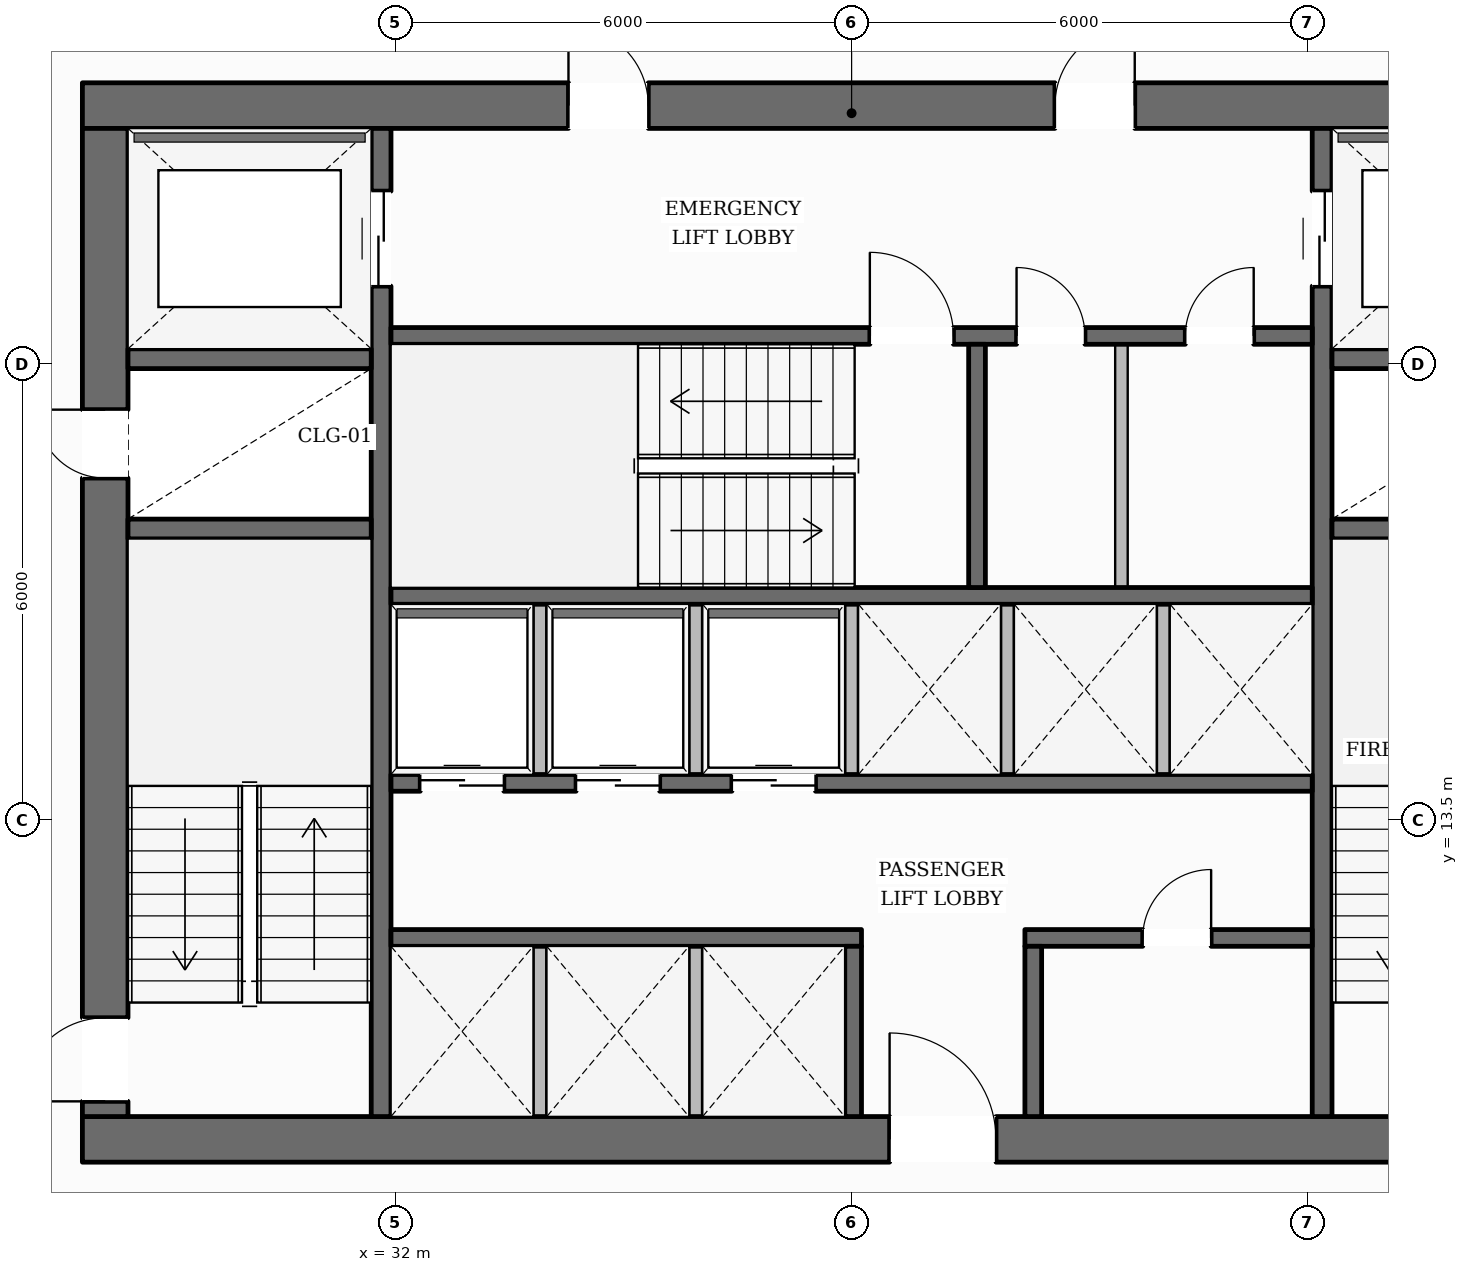
"""IFC4 building model, lengths in metres.
Left out: names, types, materials, properties, quantities, classifications, styles, units other than length and angle.
Written with IfcOpenShell. Run it as: python <this file> out.ifc"""

import sys

from ifc_helpers import new_model, si_unit, direction, frame, frame_2d, origin, place, context, subcontext, project, spatial, rectangle, extrude, element, fill, save


model = new_model("IFC4")
c1 = context("Model", 3, precision=1e-05, world=origin(), true_north=direction((0.0, 1.0)))
c2 = subcontext(c1, "Body", "Model", "MODEL_VIEW")
j1 = project(units=[si_unit("LENGTHUNIT", "METRE"), si_unit("PLANEANGLEUNIT", "RADIAN")], contexts=[c1])
p1 = place(None, origin())
s1 = spatial("IfcSite", under=j1, at=p1, CompositionType="ELEMENT")
p2 = place(p1, origin())
s2 = spatial("IfcBuilding", under=s1, at=p2, CompositionType="ELEMENT")
p3 = place(p2, frame((0.0, 0.0, 17.55)))
s3 = spatial("IfcBuildingStorey", under=s2, at=p3, CompositionType="ELEMENT", Elevation=17.55)
p4 = place(p3, frame((27.88, 9.3, 0.0), z_axis=(0.0, 0.0, 1.0), x_axis=(1.0, 0.0, 0.0)))
e1 = element("IfcWall", 1, at=p4, inside=s3, PredefinedType="SOLIDWALL", context=c2, shape_type="SweptSolid", body=[
    extrude(rectangle(XDim=20.24, YDim=0.6, at=frame_2d((10.12, 0.0))), origin(), (0.0, 0.0, 1.0), 3.59),
])
p5 = place(p4, frame((10.62, 0.0, 0.0)))
e2 = element("IfcOpeningElement", 2, at=p5, cuts=e1, PredefinedType="OPENING", context=c2, shape_type="SweptSolid", body=[
    extrude(rectangle(XDim=1.4, YDim=2.2, at=frame_2d((0.7, 1.1))), frame((0.0, 0.31, 0.0), z_axis=(0.0, -1.0, 0.0), x_axis=(1.0, 0.0, 0.0)), (0.0, 0.0, 1.0), 0.62),
])
p6 = place(p3, frame((27.88, 22.9, 0.0), z_axis=(0.0, 0.0, 1.0), x_axis=(1.0, 0.0, 0.0)))
e3 = element("IfcWall", 3, at=p6, inside=s3, PredefinedType="SOLIDWALL", context=c2, shape_type="SweptSolid", body=[
    extrude(rectangle(XDim=20.24, YDim=0.6, at=frame_2d((10.12, 0.0))), origin(), (0.0, 0.0, 1.0), 3.59),
])
p7 = place(p6, frame((6.395, 0.0, 0.0)))
e4 = element("IfcOpeningElement", 4, at=p7, cuts=e3, PredefinedType="OPENING", context=c2, shape_type="SweptSolid", body=[
    extrude(rectangle(XDim=1.05, YDim=2.15, at=frame_2d((0.525, 1.075))), frame((0.0, 0.31, 0.0), z_axis=(0.0, -1.0, 0.0), x_axis=(1.0, 0.0, 0.0)), (0.0, 0.0, 1.0), 0.62),
])
p8 = place(p6, frame((12.795, 0.0, 0.0)))
e5 = element("IfcOpeningElement", 5, at=p8, cuts=e3, PredefinedType="OPENING", context=c2, shape_type="SweptSolid", body=[
    extrude(rectangle(XDim=1.05, YDim=2.15, at=frame_2d((0.525, 1.075))), frame((0.0, 0.31, 0.0), z_axis=(0.0, -1.0, 0.0), x_axis=(1.0, 0.0, 0.0)), (0.0, 0.0, 1.0), 0.62),
])
p9 = place(p3, frame((28.18, 9.6, 0.0), z_axis=(0.0, 0.0, 1.0), x_axis=(0.0, 1.0, 0.0)))
e6 = element("IfcWall", 6, at=p9, inside=s3, PredefinedType="SOLIDWALL", context=c2, shape_type="SweptSolid", body=[
    extrude(rectangle(XDim=13.0, YDim=0.6, at=frame_2d((6.5, 0.0))), origin(), (0.0, 0.0, 1.0), 3.59),
])
p10 = place(p9, frame((0.2, 0.0, 0.0)))
e7 = element("IfcOpeningElement", 7, at=p10, cuts=e6, PredefinedType="OPENING", context=c2, shape_type="SweptSolid", body=[
    extrude(rectangle(XDim=1.1, YDim=2.15, at=frame_2d((0.55, 1.075))), frame((0.0, 0.31, 0.0), z_axis=(0.0, -1.0, 0.0), x_axis=(1.0, 0.0, 0.0)), (0.0, 0.0, 1.0), 0.62),
])
p11 = place(p9, frame((8.4, 0.0, 0.0)))
e8 = element("IfcOpeningElement", 8, at=p11, cuts=e6, PredefinedType="OPENING", context=c2, shape_type="SweptSolid", body=[
    extrude(rectangle(XDim=0.9, YDim=2.1, at=frame_2d((0.45, 1.05))), frame((0.0, 0.31, 0.0), z_axis=(0.0, -1.0, 0.0), x_axis=(1.0, 0.0, 0.0)), (0.0, 0.0, 1.0), 0.62),
])
p12 = place(p3, frame((31.81, 9.6, 0.0), z_axis=(0.0, 0.0, 1.0), x_axis=(0.0, 1.0, 0.0)))
e9 = element("IfcWall", 9, at=p12, inside=s3, PredefinedType="SHEAR", context=c2, shape_type="SweptSolid", body=[
    extrude(rectangle(XDim=13.0, YDim=0.26, at=frame_2d((6.5, 0.0))), origin(), (0.0, 0.0, 1.0), 3.59),
])
p13 = place(p12, frame((10.925, 0.0, 0.0)))
e10 = element("IfcOpeningElement", 10, at=p13, cuts=e9, PredefinedType="OPENING", context=c2, shape_type="SweptSolid", body=[
    extrude(rectangle(XDim=1.25, YDim=2.25, at=frame_2d((0.625, 1.125))), frame((0.0, 0.14, 0.0), z_axis=(0.0, -1.0, 0.0), x_axis=(1.0, 0.0, 0.0)), (0.0, 0.0, 1.0), 0.28),
])
p14 = place(p3, frame((44.19, 9.6, 0.0), z_axis=(0.0, 0.0, 1.0), x_axis=(0.0, 1.0, 0.0)))
e11 = element("IfcWall", 11, at=p14, inside=s3, PredefinedType="SHEAR", context=c2, shape_type="SweptSolid", body=[
    extrude(rectangle(XDim=13.0, YDim=0.26, at=frame_2d((6.5, 0.0))), origin(), (0.0, 0.0, 1.0), 3.59),
])
p15 = place(p14, frame((10.925, 0.0, 0.0)))
e12 = element("IfcOpeningElement", 12, at=p15, cuts=e11, PredefinedType="OPENING", context=c2, shape_type="SweptSolid", body=[
    extrude(rectangle(XDim=1.25, YDim=2.25, at=frame_2d((0.625, 1.125))), frame((0.0, 0.14, 0.0), z_axis=(0.0, -1.0, 0.0), x_axis=(1.0, 0.0, 0.0)), (0.0, 0.0, 1.0), 0.28),
])
for number, where, z_axis, x_axis in (
    (13, (28.48, 17.33, 0.0), (0.0, 0.0, 1.0), (1.0, 0.0, 0.0)),
    (14, (28.48, 19.57, 0.0), (0.0, 0.0, 1.0), (1.0, 0.0, 0.0)),
    (15, (44.32, 17.33, 0.0), (0.0, 0.0, 1.0), (1.0, 0.0, 0.0)),
    (16, (44.32, 19.57, 0.0), (0.0, 0.0, 1.0), (1.0, 0.0, 0.0)),
):
    element("IfcWall", number, at=place(p3, frame(where, z_axis=z_axis, x_axis=x_axis)), inside=s3, PredefinedType="SHEAR", context=c2, shape_type="SweptSolid", body=[
        extrude(rectangle(XDim=3.2, YDim=0.26, at=frame_2d((1.6, 0.0))), origin(), (0.0, 0.0, 1.0), 3.59),
    ])
p16 = place(p3, frame((31.94, 19.87, 0.0), z_axis=(0.0, 0.0, 1.0), x_axis=(1.0, 0.0, 0.0)))
e17 = element("IfcWall", 17, at=p16, inside=s3, PredefinedType="SOLIDWALL", context=c2, shape_type="SweptSolid", body=[
    extrude(rectangle(XDim=12.12, YDim=0.22, at=frame_2d((6.06, 0.0))), origin(), (0.0, 0.0, 1.0), 3.59),
])
p17 = place(p16, frame((6.3, 0.0, 0.0)))
e18 = element("IfcOpeningElement", 18, at=p17, cuts=e17, PredefinedType="OPENING", context=c2, shape_type="SweptSolid", body=[
    extrude(rectangle(XDim=1.1, YDim=2.15, at=frame_2d((0.55, 1.075))), frame((0.0, 0.12, 0.0), z_axis=(0.0, -1.0, 0.0), x_axis=(1.0, 0.0, 0.0)), (0.0, 0.0, 1.0), 0.24),
])
p18 = place(p16, frame((8.23, 0.0, 0.0)))
e19 = element("IfcOpeningElement", 19, at=p18, cuts=e17, PredefinedType="OPENING", context=c2, shape_type="SweptSolid", body=[
    extrude(rectangle(XDim=0.9, YDim=2.1, at=frame_2d((0.45, 1.05))), frame((0.0, 0.12, 0.0), z_axis=(0.0, -1.0, 0.0), x_axis=(1.0, 0.0, 0.0)), (0.0, 0.0, 1.0), 0.24),
])
p19 = place(p16, frame((10.45, 0.0, 0.0)))
e20 = element("IfcOpeningElement", 20, at=p19, cuts=e17, PredefinedType="OPENING", context=c2, shape_type="SweptSolid", body=[
    extrude(rectangle(XDim=0.9, YDim=2.1, at=frame_2d((0.45, 1.05))), frame((0.0, 0.12, 0.0), z_axis=(0.0, -1.0, 0.0), x_axis=(1.0, 0.0, 0.0)), (0.0, 0.0, 1.0), 0.24),
])
p20 = place(p3, frame((31.94, 16.45, 0.0), z_axis=(0.0, 0.0, 1.0), x_axis=(1.0, 0.0, 0.0)))
e21 = element("IfcWall", 21, at=p20, inside=s3, PredefinedType="SOLIDWALL", context=c2, shape_type="SweptSolid", body=[
    extrude(rectangle(XDim=12.12, YDim=0.22, at=frame_2d((6.06, 0.0))), origin(), (0.0, 0.0, 1.0), 3.59),
])
p21 = place(p3, frame((39.65, 16.56, 0.0), z_axis=(0.0, 0.0, 1.0), x_axis=(0.0, 1.0, 0.0)))
e22 = element("IfcWall", 22, at=p21, inside=s3, PredefinedType="SOLIDWALL", context=c2, shape_type="SweptSolid", body=[
    extrude(rectangle(XDim=3.2, YDim=0.22, at=frame_2d((1.6, 0.0))), origin(), (0.0, 0.0, 1.0), 3.59),
])
p22 = place(p3, frame((31.94, 13.99, 0.0), z_axis=(0.0, 0.0, 1.0), x_axis=(1.0, 0.0, 0.0)))
e23 = element("IfcWall", 23, at=p22, inside=s3, PredefinedType="SOLIDWALL", context=c2, shape_type="SweptSolid", body=[
    extrude(rectangle(XDim=12.12, YDim=0.22, at=frame_2d((6.06, 0.0))), origin(), (0.0, 0.0, 1.0), 3.59),
])
p23 = place(p22, frame((0.385, 0.0, 0.0)))
e24 = element("IfcOpeningElement", 24, at=p23, cuts=e23, PredefinedType="OPENING", context=c2, shape_type="SweptSolid", body=[
    extrude(rectangle(XDim=1.1, YDim=2.2, at=frame_2d((0.55, 1.1))), frame((0.0, 0.12, 0.0), z_axis=(0.0, -1.0, 0.0), x_axis=(1.0, 0.0, 0.0)), (0.0, 0.0, 1.0), 0.24),
])
p24 = place(p22, frame((2.435, 0.0, 0.0)))
e25 = element("IfcOpeningElement", 25, at=p24, cuts=e23, PredefinedType="OPENING", context=c2, shape_type="SweptSolid", body=[
    extrude(rectangle(XDim=1.1, YDim=2.2, at=frame_2d((0.55, 1.1))), frame((0.0, 0.12, 0.0), z_axis=(0.0, -1.0, 0.0), x_axis=(1.0, 0.0, 0.0)), (0.0, 0.0, 1.0), 0.24),
])
p25 = place(p22, frame((4.485, 0.0, 0.0)))
e26 = element("IfcOpeningElement", 26, at=p25, cuts=e23, PredefinedType="OPENING", context=c2, shape_type="SweptSolid", body=[
    extrude(rectangle(XDim=1.1, YDim=2.2, at=frame_2d((0.55, 1.1))), frame((0.0, 0.12, 0.0), z_axis=(0.0, -1.0, 0.0), x_axis=(1.0, 0.0, 0.0)), (0.0, 0.0, 1.0), 0.24),
])
p26 = place(p3, frame((31.94, 11.95, 0.0), z_axis=(0.0, 0.0, 1.0), x_axis=(1.0, 0.0, 0.0)))
e27 = element("IfcWall", 27, at=p26, inside=s3, PredefinedType="SOLIDWALL", context=c2, shape_type="SweptSolid", body=[
    extrude(rectangle(XDim=6.19, YDim=0.22, at=frame_2d((3.095, 0.0))), origin(), (0.0, 0.0, 1.0), 3.59),
])
p27 = place(p3, frame((40.28, 11.95, 0.0), z_axis=(0.0, 0.0, 1.0), x_axis=(1.0, 0.0, 0.0)))
e28 = element("IfcWall", 28, at=p27, inside=s3, PredefinedType="SOLIDWALL", context=c2, shape_type="SweptSolid", body=[
    extrude(rectangle(XDim=3.78, YDim=0.22, at=frame_2d((1.89, 0.0))), origin(), (0.0, 0.0, 1.0), 3.59),
])
p28 = place(p27, frame((1.55, 0.0, 0.0)))
e29 = element("IfcOpeningElement", 29, at=p28, cuts=e28, PredefinedType="OPENING", context=c2, shape_type="SweptSolid", body=[
    extrude(rectangle(XDim=0.9, YDim=2.1, at=frame_2d((0.45, 1.05))), frame((0.0, 0.12, 0.0), z_axis=(0.0, -1.0, 0.0), x_axis=(1.0, 0.0, 0.0)), (0.0, 0.0, 1.0), 0.24),
])
for number, where, z_axis, x_axis in (
    (30, (38.02, 9.6, 0.0), (0.0, 0.0, 1.0), (0.0, 1.0, 0.0)),
    (31, (40.39, 9.6, 0.0), (0.0, 0.0, 1.0), (0.0, 1.0, 0.0)),
):
    element("IfcWall", number, at=place(p3, frame(where, z_axis=z_axis, x_axis=x_axis)), inside=s3, PredefinedType="SOLIDWALL", context=c2, shape_type="SweptSolid", body=[
        extrude(rectangle(XDim=2.24, YDim=0.22, at=frame_2d((1.12, 0.0))), origin(), (0.0, 0.0, 1.0), 3.59),
    ])
p29 = place(p3, frame((13.187, 14.973, 0.0), z_axis=(0.0, 0.0, 1.0), x_axis=(0.497033240721, 0.867731500879, 0.0)))
e32 = element("IfcWall", 32, at=p29, inside=s3, PredefinedType="STANDARD", context=c2, shape_type="SweptSolid", body=[
    extrude(rectangle(XDim=33.917, YDim=0.38, at=frame_2d((16.958, 0.0))), origin(), (0.0, 0.0, 1.0), 2.97),
])
p30 = place(p29, frame((29.867, 0.0, 0.65)))
e33 = element("IfcOpeningElement", 33, at=p30, cuts=e32, PredefinedType="OPENING", context=c2, shape_type="SweptSolid", body=[
    extrude(rectangle(XDim=1.65, YDim=1.75, at=frame_2d((0.825, 0.875))), frame((0.0, 0.2, 0.0), z_axis=(0.0, -1.0, 0.0), x_axis=(1.0, 0.0, 0.0)), (0.0, 0.0, 1.0), 0.4),
])
p31 = place(p29, frame((24.373, 0.0, 0.65)))
e34 = element("IfcOpeningElement", 34, at=p31, cuts=e32, PredefinedType="OPENING", context=c2, shape_type="SweptSolid", body=[
    extrude(rectangle(XDim=1.65, YDim=1.75, at=frame_2d((0.825, 0.875))), frame((0.0, 0.2, 0.0), z_axis=(0.0, -1.0, 0.0), x_axis=(1.0, 0.0, 0.0)), (0.0, 0.0, 1.0), 0.4),
])
p32 = place(p29, frame((7.89, 0.0, 0.65)))
e35 = element("IfcOpeningElement", 35, at=p32, cuts=e32, PredefinedType="OPENING", context=c2, shape_type="SweptSolid", body=[
    extrude(rectangle(XDim=1.65, YDim=1.75, at=frame_2d((0.825, 0.875))), frame((0.0, 0.2, 0.0), z_axis=(0.0, -1.0, 0.0), x_axis=(1.0, 0.0, 0.0)), (0.0, 0.0, 1.0), 0.4),
])
p33 = place(p29, frame((2.396, 0.0, 0.65)))
e36 = element("IfcOpeningElement", 36, at=p33, cuts=e32, PredefinedType="OPENING", context=c2, shape_type="SweptSolid", body=[
    extrude(rectangle(XDim=1.65, YDim=1.75, at=frame_2d((0.825, 0.875))), frame((0.0, 0.2, 0.0), z_axis=(0.0, -1.0, 0.0), x_axis=(1.0, 0.0, 0.0)), (0.0, 0.0, 1.0), 0.4),
])
for number, where, z_axis, x_axis in (
    (37, (33.9, 9.6, 0.0), (0.0, 0.0, 1.0), (0.0, 1.0, 0.0)),
    (38, (35.95, 9.6, 0.0), (0.0, 0.0, 1.0), (0.0, 1.0, 0.0)),
    (39, (33.9, 14.1, 0.0), (0.0, 0.0, 1.0), (0.0, 1.0, 0.0)),
    (40, (35.95, 14.1, 0.0), (0.0, 0.0, 1.0), (0.0, 1.0, 0.0)),
    (41, (38.0, 14.1, 0.0), (0.0, 0.0, 1.0), (0.0, 1.0, 0.0)),
    (42, (40.05, 14.1, 0.0), (0.0, 0.0, 1.0), (0.0, 1.0, 0.0)),
    (43, (42.1, 14.1, 0.0), (0.0, 0.0, 1.0), (0.0, 1.0, 0.0)),
):
    element("IfcWall", number, at=place(p3, frame(where, z_axis=z_axis, x_axis=x_axis)), inside=s3, PredefinedType="PARTITIONING", context=c2, shape_type="SweptSolid", body=[
        extrude(rectangle(XDim=2.24, YDim=0.165, at=frame_2d((1.12, 0.0))), origin(), (0.0, 0.0, 1.0), 3.59),
    ])
p34 = place(p3, frame((41.55, 16.56, 0.0), z_axis=(0.0, 0.0, 1.0), x_axis=(0.0, 1.0, 0.0)))
e44 = element("IfcWall", 44, at=p34, inside=s3, PredefinedType="PARTITIONING", context=c2, shape_type="SweptSolid", body=[
    extrude(rectangle(XDim=3.2, YDim=0.165, at=frame_2d((1.6, 0.0))), origin(), (0.0, 0.0, 1.0), 3.59),
])
p35 = place(p10, origin())
e45 = element("IfcDoor", 45, at=p35, inside=s3, OperationType="SINGLE_SWING_LEFT", PredefinedType="DOOR", context=c2, shape_type="SweptSolid", body=[
    extrude(rectangle(XDim=1.1, YDim=2.15, at=frame_2d((0.55, 1.075))), frame((0.0, 0.025, 0.0), z_axis=(0.0, -1.0, 0.0), x_axis=(1.0, 0.0, 0.0)), (0.0, 0.0, 1.0), 0.05),
])
fill(e7, e45)
p36 = place(p17, origin())
e46 = element("IfcDoor", 46, at=p36, inside=s3, OperationType="SINGLE_SWING_LEFT", PredefinedType="DOOR", context=c2, shape_type="SweptSolid", body=[
    extrude(rectangle(XDim=1.1, YDim=2.15, at=frame_2d((0.55, 1.075))), frame((0.0, 0.025, 0.0), z_axis=(0.0, -1.0, 0.0), x_axis=(1.0, 0.0, 0.0)), (0.0, 0.0, 1.0), 0.05),
])
fill(e18, e46)
p37 = place(p11, origin())
e47 = element("IfcDoor", 47, at=p37, inside=s3, OperationType="SINGLE_SWING_RIGHT", PredefinedType="DOOR", context=c2, shape_type="SweptSolid", body=[
    extrude(rectangle(XDim=0.9, YDim=2.1, at=frame_2d((0.45, 1.05))), frame((0.0, 0.025, 0.0), z_axis=(0.0, -1.0, 0.0), x_axis=(1.0, 0.0, 0.0)), (0.0, 0.0, 1.0), 0.05),
])
fill(e8, e47)
p38 = place(p7, origin())
e48 = element("IfcDoor", 48, at=p38, inside=s3, OperationType="SINGLE_SWING_LEFT", PredefinedType="DOOR", context=c2, shape_type="SweptSolid", body=[
    extrude(rectangle(XDim=1.05, YDim=2.15, at=frame_2d((0.525, 1.075))), frame((0.0, 0.025, 0.0), z_axis=(0.0, -1.0, 0.0), x_axis=(1.0, 0.0, 0.0)), (0.0, 0.0, 1.0), 0.05),
])
fill(e4, e48)
p39 = place(p8, origin())
e49 = element("IfcDoor", 49, at=p39, inside=s3, OperationType="SINGLE_SWING_RIGHT", PredefinedType="DOOR", context=c2, shape_type="SweptSolid", body=[
    extrude(rectangle(XDim=1.05, YDim=2.15, at=frame_2d((0.525, 1.075))), frame((0.0, 0.025, 0.0), z_axis=(0.0, -1.0, 0.0), x_axis=(1.0, 0.0, 0.0)), (0.0, 0.0, 1.0), 0.05),
])
fill(e5, e49)
p40 = place(p13, origin())
e50 = element("IfcDoor", 50, at=p40, inside=s3, OperationType="DOUBLE_DOOR_SLIDING", PredefinedType="DOOR", context=c2, shape_type="SweptSolid", body=[
    extrude(rectangle(XDim=1.25, YDim=2.25, at=frame_2d((0.625, 1.125))), frame((0.0, 0.025, 0.0), z_axis=(0.0, -1.0, 0.0), x_axis=(1.0, 0.0, 0.0)), (0.0, 0.0, 1.0), 0.05),
])
fill(e10, e50)
p41 = place(p15, origin())
e51 = element("IfcDoor", 51, at=p41, inside=s3, OperationType="DOUBLE_DOOR_SLIDING", PredefinedType="DOOR", context=c2, shape_type="SweptSolid", body=[
    extrude(rectangle(XDim=1.25, YDim=2.25, at=frame_2d((0.625, 1.125))), frame((0.0, 0.025, 0.0), z_axis=(0.0, -1.0, 0.0), x_axis=(1.0, 0.0, 0.0)), (0.0, 0.0, 1.0), 0.05),
])
fill(e12, e51)
p42 = place(p5, origin())
e52 = element("IfcDoor", 52, at=p42, inside=s3, OperationType="SINGLE_SWING_LEFT", PredefinedType="DOOR", context=c2, shape_type="SweptSolid", body=[
    extrude(rectangle(XDim=1.4, YDim=2.2, at=frame_2d((0.7, 1.1))), frame((0.0, 0.025, 0.0), z_axis=(0.0, -1.0, 0.0), x_axis=(1.0, 0.0, 0.0)), (0.0, 0.0, 1.0), 0.05),
])
fill(e2, e52)
p43 = place(p23, origin())
e53 = element("IfcDoor", 53, at=p43, inside=s3, OperationType="DOUBLE_DOOR_SLIDING", PredefinedType="DOOR", context=c2, shape_type="SweptSolid", body=[
    extrude(rectangle(XDim=1.1, YDim=2.2, at=frame_2d((0.55, 1.1))), frame((0.0, 0.025, 0.0), z_axis=(0.0, -1.0, 0.0), x_axis=(1.0, 0.0, 0.0)), (0.0, 0.0, 1.0), 0.05),
])
fill(e24, e53)
p44 = place(p24, origin())
e54 = element("IfcDoor", 54, at=p44, inside=s3, OperationType="DOUBLE_DOOR_SLIDING", PredefinedType="DOOR", context=c2, shape_type="SweptSolid", body=[
    extrude(rectangle(XDim=1.1, YDim=2.2, at=frame_2d((0.55, 1.1))), frame((0.0, 0.025, 0.0), z_axis=(0.0, -1.0, 0.0), x_axis=(1.0, 0.0, 0.0)), (0.0, 0.0, 1.0), 0.05),
])
fill(e25, e54)
p45 = place(p25, origin())
e55 = element("IfcDoor", 55, at=p45, inside=s3, OperationType="DOUBLE_DOOR_SLIDING", PredefinedType="DOOR", context=c2, shape_type="SweptSolid", body=[
    extrude(rectangle(XDim=1.1, YDim=2.2, at=frame_2d((0.55, 1.1))), frame((0.0, 0.025, 0.0), z_axis=(0.0, -1.0, 0.0), x_axis=(1.0, 0.0, 0.0)), (0.0, 0.0, 1.0), 0.05),
])
fill(e26, e55)
p46 = place(p18, origin())
e56 = element("IfcDoor", 56, at=p46, inside=s3, OperationType="SINGLE_SWING_LEFT", PredefinedType="DOOR", context=c2, shape_type="SweptSolid", body=[
    extrude(rectangle(XDim=0.9, YDim=2.1, at=frame_2d((0.45, 1.05))), frame((0.0, 0.025, 0.0), z_axis=(0.0, -1.0, 0.0), x_axis=(1.0, 0.0, 0.0)), (0.0, 0.0, 1.0), 0.05),
])
fill(e19, e56)
p47 = place(p19, origin())
e57 = element("IfcDoor", 57, at=p47, inside=s3, OperationType="SINGLE_SWING_RIGHT", PredefinedType="DOOR", context=c2, shape_type="SweptSolid", body=[
    extrude(rectangle(XDim=0.9, YDim=2.1, at=frame_2d((0.45, 1.05))), frame((0.0, 0.025, 0.0), z_axis=(0.0, -1.0, 0.0), x_axis=(1.0, 0.0, 0.0)), (0.0, 0.0, 1.0), 0.05),
])
fill(e20, e57)
p48 = place(p28, origin())
e58 = element("IfcDoor", 58, at=p48, inside=s3, OperationType="SINGLE_SWING_RIGHT", PredefinedType="DOOR", context=c2, shape_type="SweptSolid", body=[
    extrude(rectangle(XDim=0.9, YDim=2.1, at=frame_2d((0.45, 1.05))), frame((0.0, 0.025, 0.0), z_axis=(0.0, -1.0, 0.0), x_axis=(1.0, 0.0, 0.0)), (0.0, 0.0, 1.0), 0.05),
])
fill(e29, e58)
save(model, sys.argv[1])
